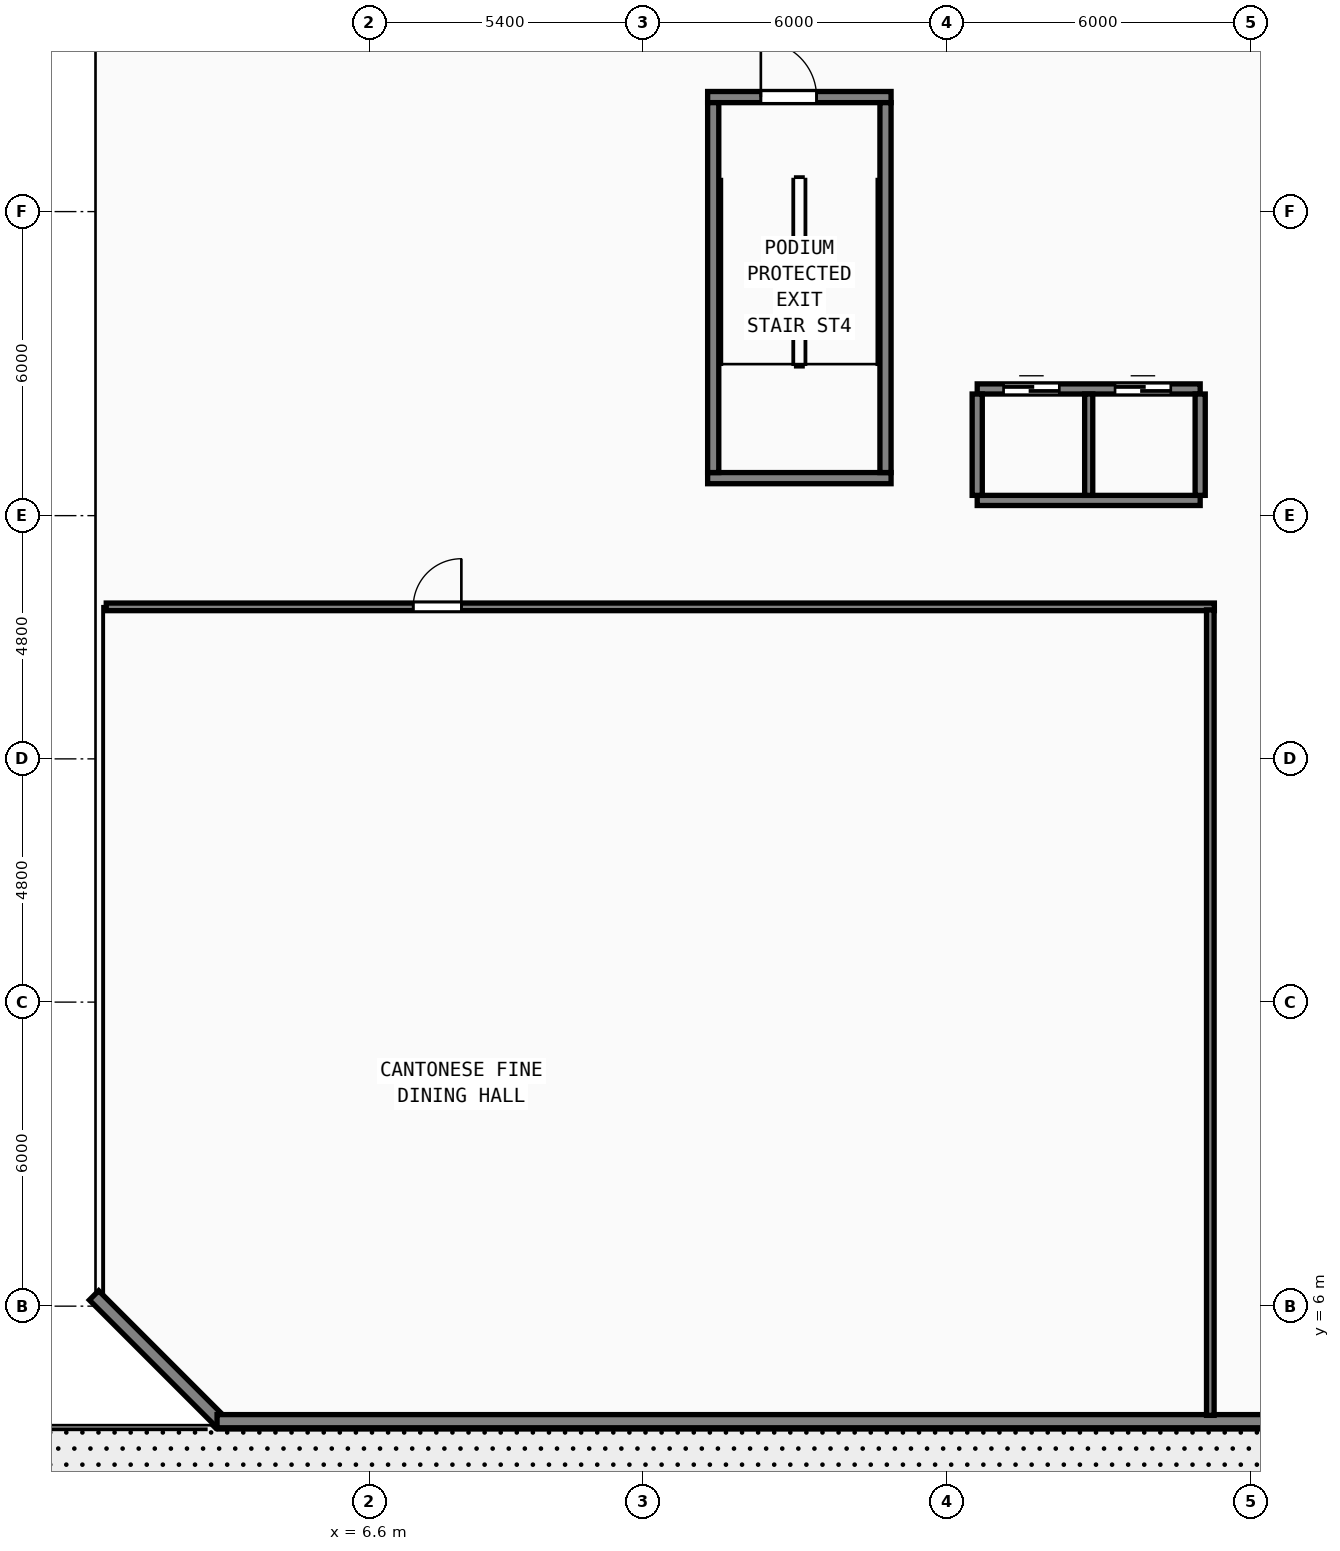
"""IFC4 building model, lengths in metres.
Left out: names, types, materials, properties, quantities, classifications, styles, units other than length and angle.
Written with IfcOpenShell. Run it as: python <this file> out.ifc"""

import sys

from ifc_helpers import new_model, si_unit, direction, frame, frame_2d, origin, origin_2d, place, context, subcontext, project, spatial, rectangle, hollow_rectangle, i_section, extrude, element, fill, save


model = new_model("IFC4")
c1 = context("Model", 3, precision=1e-05, world=origin(), true_north=direction((0.0, 1.0)))
c2 = subcontext(c1, "Body", "Model", "MODEL_VIEW")
j1 = project(units=[si_unit("LENGTHUNIT", "METRE"), si_unit("PLANEANGLEUNIT", "RADIAN")], contexts=[c1])
p1 = place(None, origin())
s1 = spatial("IfcSite", under=j1, at=p1, CompositionType="ELEMENT")
p2 = place(p1, origin())
s2 = spatial("IfcBuilding", under=s1, at=p2, CompositionType="ELEMENT")
p3 = place(p2, frame((0.0, 0.0, 5.4)))
s3 = spatial("IfcBuildingStorey", under=s2, at=p3, CompositionType="ELEMENT", Elevation=5.4)
p4 = place(p3, frame((13.28, 29.86, 0.0), z_axis=(0.0, 0.0, 1.0), x_axis=(1.0, 0.0, 0.0)))
e1 = element("IfcWall", 1, at=p4, inside=s3, PredefinedType="SHEAR", context=c2, shape_type="SweptSolid", body=[
    extrude(rectangle(XDim=3.62, YDim=0.22, at=frame_2d((1.81, 0.0))), origin(), (0.0, 0.0, 1.0), 4.56),
])
p5 = place(p4, frame((1.05, 0.0, 0.0)))
e2 = element("IfcOpeningElement", 2, at=p5, cuts=e1, PredefinedType="OPENING", context=c2, shape_type="SweptSolid", body=[
    extrude(rectangle(XDim=1.1, YDim=2.15, at=frame_2d((0.55, 1.075))), frame((0.0, 0.12, 0.0), z_axis=(0.0, -1.0, 0.0), x_axis=(1.0, 0.0, 0.0)), (0.0, 0.0, 1.0), 0.24),
])
p6 = place(p3, frame((13.28, 22.34, 0.0), z_axis=(0.0, 0.0, 1.0), x_axis=(1.0, 0.0, 0.0)))
e3 = element("IfcWall", 3, at=p6, inside=s3, PredefinedType="SHEAR", context=c2, shape_type="SweptSolid", body=[
    extrude(rectangle(XDim=3.62, YDim=0.22, at=frame_2d((1.81, 0.0))), origin(), (0.0, 0.0, 1.0), 4.56),
])
for number, where, z_axis, x_axis in (
    (4, (13.39, 22.45, 0.0), (0.0, 0.0, 1.0), (0.0, 1.0, 0.0)),
    (5, (16.79, 22.45, 0.0), (0.0, 0.0, 1.0), (0.0, 1.0, 0.0)),
):
    element("IfcWall", number, at=place(p3, frame(where, z_axis=z_axis, x_axis=x_axis)), inside=s3, PredefinedType="SHEAR", context=c2, shape_type="SweptSolid", body=[
        extrude(rectangle(XDim=7.3, YDim=0.22, at=frame_2d((3.65, 0.0))), origin(), (0.0, 0.0, 1.0), 4.56),
    ])
for number, where, z_axis, x_axis in (
    (6, (24.0, 21.6, 0.0), (0.0, 0.0, 1.0), (1.0, 0.0, 0.0)),
    (7, (12.6, 16.8, 0.0), (0.0, 0.0, 1.0), (1.0, 0.0, 0.0)),
    (8, (12.6, 27.6, 0.0), (0.0, 0.0, 1.0), (1.0, 0.0, 0.0)),
):
    element("IfcColumn", number, at=place(p3, frame(where, z_axis=z_axis, x_axis=x_axis)), inside=s3, PredefinedType="COLUMN", context=c2, shape_type="SweptSolid", body=[
        extrude(hollow_rectangle(XDim=1.3, YDim=1.3, WallThickness=0.048, at=origin_2d()), origin(), (0.0, 0.0, 1.0), 4.8),
    ])
for number, where, z_axis, x_axis in (
    (9, (6.0, 17.4, 0.0), (0.0, 0.0, 1.0), (1.0, 0.0, 0.0)),
    (10, (6.0, 27.6, 0.0), (0.0, 0.0, 1.0), (1.0, 0.0, 0.0)),
):
    element("IfcColumn", number, at=place(p3, frame(where, z_axis=z_axis, x_axis=x_axis)), inside=s3, PredefinedType="COLUMN", context=c2, shape_type="SweptSolid", body=[
        extrude(hollow_rectangle(XDim=1.15, YDim=1.15, WallThickness=0.042, at=origin_2d()), origin(), (0.0, 0.0, 1.0), 4.8),
    ])
for number, where, z_axis, x_axis in (
    (11, (18.0, 7.4, 0.0), (0.0, 0.0, 1.0), (1.0, 0.0, 0.0)),
    (12, (18.0, 11.0, 0.0), (0.0, 0.0, 1.0), (1.0, 0.0, 0.0)),
    (13, (18.0, 13.2, 0.0), (0.0, 0.0, 1.0), (1.0, 0.0, 0.0)),
    (14, (18.0, 16.8, 0.0), (0.0, 0.0, 1.0), (1.0, 0.0, 0.0)),
):
    element("IfcColumn", number, at=place(p3, frame(where, z_axis=z_axis, x_axis=x_axis)), inside=s3, PredefinedType="COLUMN", context=c2, shape_type="SweptSolid", body=[
        extrude(i_section(OverallWidth=0.3, OverallDepth=0.3, WebThickness=0.01, FlangeThickness=0.015, FilletRadius=0.018, at=origin_2d()), origin(), (0.0, 0.0, 1.0), 4.8),
    ])
p7 = place(p3, frame((1.171, 6.213, 0.0), z_axis=(0.0, 0.0, 1.0), x_axis=(0.707106781187, -0.707106781187, 0.0)))
e15 = element("IfcWall", 15, at=p7, inside=s3, PredefinedType="SOLIDWALL", context=c2, shape_type="SweptSolid", body=[
    extrude(rectangle(XDim=3.566, YDim=0.26, at=frame_2d((1.783, 0.0))), origin(), (0.0, 0.0, 1.0), 4.56),
])
p8 = place(p3, frame((3.599, 3.73, 0.0), z_axis=(0.0, 0.0, 1.0), x_axis=(1.0, 0.0, 0.0)))
e16 = element("IfcWall", 16, at=p8, inside=s3, PredefinedType="SOLIDWALL", context=c2, shape_type="SweptSolid", body=[
    extrude(rectangle(XDim=69.602, YDim=0.26, at=frame_2d((34.801, 0.0))), origin(), (0.0, 0.0, 1.0), 4.56),
])
p9 = place(p8, frame((69.382, 0.0, 0.0), z_axis=(0.0, 0.0, 1.0), x_axis=(-1.0, 0.0, 0.0)))
e17 = element("IfcOpeningElement", 17, at=p9, cuts=e16, PredefinedType="OPENING", context=c2, shape_type="SweptSolid", body=[
    extrude(rectangle(XDim=1.5, YDim=2.2, at=frame_2d((0.75, 1.1))), frame((0.0, 0.14, 0.0), z_axis=(0.0, -1.0, 0.0), x_axis=(1.0, 0.0, 0.0)), (0.0, 0.0, 1.0), 0.28),
])
p10 = place(p3, frame((18.6, 24.1, 0.0), z_axis=(0.0, 0.0, 1.0), x_axis=(1.0, 0.0, 0.0)))
e18 = element("IfcWall", 18, at=p10, inside=s3, PredefinedType="SOLIDWALL", context=c2, shape_type="SweptSolid", body=[
    extrude(rectangle(XDim=4.4, YDim=0.2, at=frame_2d((2.2, 0.0))), origin(), (0.0, 0.0, 1.0), 4.56),
])
p11 = place(p10, frame((0.52, 0.0, 0.0)))
e19 = element("IfcOpeningElement", 19, at=p11, cuts=e18, PredefinedType="OPENING", context=c2, shape_type="SweptSolid", body=[
    extrude(rectangle(XDim=1.1, YDim=2.2, at=frame_2d((0.55, 1.1))), frame((0.0, 0.11, 0.0), z_axis=(0.0, -1.0, 0.0), x_axis=(1.0, 0.0, 0.0)), (0.0, 0.0, 1.0), 0.22),
])
p12 = place(p10, frame((2.72, 0.0, 0.0)))
e20 = element("IfcOpeningElement", 20, at=p12, cuts=e18, PredefinedType="OPENING", context=c2, shape_type="SweptSolid", body=[
    extrude(rectangle(XDim=1.1, YDim=2.2, at=frame_2d((0.55, 1.1))), frame((0.0, 0.11, 0.0), z_axis=(0.0, -1.0, 0.0), x_axis=(1.0, 0.0, 0.0)), (0.0, 0.0, 1.0), 0.22),
])
p13 = place(p3, frame((18.6, 21.9, 0.0), z_axis=(0.0, 0.0, 1.0), x_axis=(1.0, 0.0, 0.0)))
e21 = element("IfcWall", 21, at=p13, inside=s3, PredefinedType="SOLIDWALL", context=c2, shape_type="SweptSolid", body=[
    extrude(rectangle(XDim=4.4, YDim=0.2, at=frame_2d((2.2, 0.0))), origin(), (0.0, 0.0, 1.0), 4.56),
])
for number, where, z_axis, x_axis in (
    (22, (18.6, 22.0, 0.0), (0.0, 0.0, 1.0), (0.0, 1.0, 0.0)),
    (23, (23.0, 22.0, 0.0), (0.0, 0.0, 1.0), (0.0, 1.0, 0.0)),
):
    element("IfcWall", number, at=place(p3, frame(where, z_axis=z_axis, x_axis=x_axis)), inside=s3, PredefinedType="SOLIDWALL", context=c2, shape_type="SweptSolid", body=[
        extrude(rectangle(XDim=2.0, YDim=0.2, at=frame_2d((1.0, 0.0))), origin(), (0.0, 0.0, 1.0), 4.56),
    ])
p14 = place(p3, frame((20.8, 22.0, 0.0), z_axis=(0.0, 0.0, 1.0), x_axis=(0.0, 1.0, 0.0)))
e24 = element("IfcWall", 24, at=p14, inside=s3, PredefinedType="SOLIDWALL", context=c2, shape_type="SweptSolid", body=[
    extrude(rectangle(XDim=2.0, YDim=0.16, at=frame_2d((1.0, 0.0))), origin(), (0.0, 0.0, 1.0), 4.56),
])
p15 = place(p3, frame((1.412, 19.8, 0.0), z_axis=(0.0, 0.0, 1.0), x_axis=(1.0, 0.0, 0.0)))
e25 = element("IfcWall", 25, at=p15, inside=s3, PredefinedType="PARTITIONING", context=c2, shape_type="SweptSolid", body=[
    extrude(rectangle(XDim=21.868, YDim=0.15, at=frame_2d((10.934, 0.0))), origin(), (0.0, 0.0, 1.0), 4.56),
])
p16 = place(p15, frame((7.008, 0.0, 0.0), z_axis=(0.0, 0.0, 1.0), x_axis=(-1.0, 0.0, 0.0)))
e26 = element("IfcOpeningElement", 26, at=p16, cuts=e25, PredefinedType="OPENING", context=c2, shape_type="SweptSolid", body=[
    extrude(rectangle(XDim=0.95, YDim=2.12, at=frame_2d((0.475, 1.06))), frame((0.0, 0.085, 0.0), z_axis=(0.0, -1.0, 0.0), x_axis=(1.0, 0.0, 0.0)), (0.0, 0.0, 1.0), 0.17),
])
p17 = place(p3, frame((23.2, 3.845, 0.0), z_axis=(0.0, 0.0, 1.0), x_axis=(0.0, 1.0, 0.0)))
e27 = element("IfcWall", 27, at=p17, inside=s3, PredefinedType="PARTITIONING", context=c2, shape_type="SweptSolid", body=[
    extrude(rectangle(XDim=15.895, YDim=0.15, at=frame_2d((7.948, 0.0))), origin(), (0.0, 0.0, 1.0), 4.56),
])
p18 = place(p5, origin())
e28 = element("IfcDoor", 28, at=p18, inside=s3, OperationType="SINGLE_SWING_LEFT", PredefinedType="DOOR", context=c2, shape_type="SweptSolid", body=[
    extrude(rectangle(XDim=1.1, YDim=2.15, at=frame_2d((0.55, 1.075))), frame((0.0, 0.025, 0.0), z_axis=(0.0, -1.0, 0.0), x_axis=(1.0, 0.0, 0.0)), (0.0, 0.0, 1.0), 0.05),
])
fill(e2, e28)
p19 = place(p11, origin())
e29 = element("IfcDoor", 29, at=p19, inside=s3, OperationType="SLIDING_TO_LEFT", PredefinedType="DOOR", context=c2, shape_type="SweptSolid", body=[
    extrude(rectangle(XDim=1.1, YDim=2.2, at=frame_2d((0.55, 1.1))), frame((0.0, 0.025, 0.0), z_axis=(0.0, -1.0, 0.0), x_axis=(1.0, 0.0, 0.0)), (0.0, 0.0, 1.0), 0.05),
])
fill(e19, e29)
p20 = place(p12, origin())
e30 = element("IfcDoor", 30, at=p20, inside=s3, OperationType="SLIDING_TO_LEFT", PredefinedType="DOOR", context=c2, shape_type="SweptSolid", body=[
    extrude(rectangle(XDim=1.1, YDim=2.2, at=frame_2d((0.55, 1.1))), frame((0.0, 0.025, 0.0), z_axis=(0.0, -1.0, 0.0), x_axis=(1.0, 0.0, 0.0)), (0.0, 0.0, 1.0), 0.05),
])
fill(e20, e30)
p21 = place(p16, origin())
e31 = element("IfcDoor", 31, at=p21, inside=s3, OperationType="SINGLE_SWING_LEFT", PredefinedType="DOOR", context=c2, shape_type="SweptSolid", body=[
    extrude(rectangle(XDim=0.95, YDim=2.12, at=frame_2d((0.475, 1.06))), frame((0.0, 0.025, 0.0), z_axis=(0.0, -1.0, 0.0), x_axis=(1.0, 0.0, 0.0)), (0.0, 0.0, 1.0), 0.05),
])
fill(e26, e31)
save(model, sys.argv[1])
